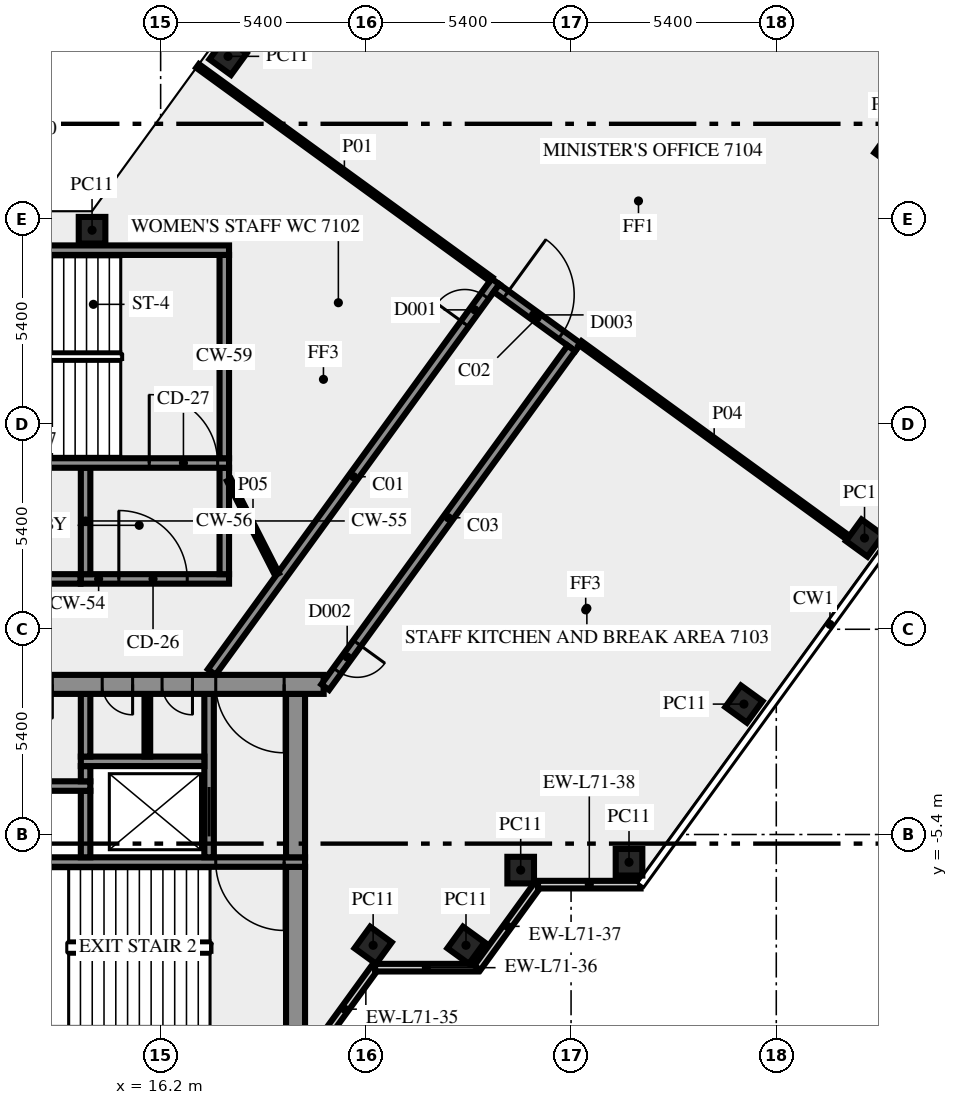
"""IFC4 building model, lengths in metres.
Left out: names, types, materials, properties, quantities, classifications, styles, units other than length and angle.
Written with IfcOpenShell. Run it as: python <this file> out.ifc"""

import sys

from ifc_helpers import new_model, si_unit, direction, frame, frame_2d, origin, origin_2d, place, context, subcontext, project, spatial, rectangle, extrude, element, fill, save


model = new_model("IFC4")
c1 = context("Model", 3, precision=1e-05, world=origin(), true_north=direction((0.0, 1.0)))
c2 = subcontext(c1, "Body", "Model", "MODEL_VIEW")
j1 = project(units=[si_unit("LENGTHUNIT", "METRE"), si_unit("PLANEANGLEUNIT", "RADIAN")], contexts=[c1])
p1 = place(None, origin())
s1 = spatial("IfcSite", under=j1, at=p1, CompositionType="ELEMENT")
p2 = place(p1, origin())
s2 = spatial("IfcBuilding", under=s1, at=p2, CompositionType="ELEMENT")
p3 = place(p2, frame((0.0, 0.0, 307.0)))
s3 = spatial("IfcBuildingStorey", under=s2, at=p3, CompositionType="ELEMENT", Elevation=307.0)
for number, where, z_axis, x_axis in (
    (1, (21.792, -8.315, 0.0), (0.0, 0.0, 1.0), (0.588, 0.809, 0.0)),
    (2, (24.235, -8.315, 0.0), (0.0, 0.0, 1.0), (0.588, 0.809, 0.0)),
    (3, (25.674, -6.337, 0.0), (0.0, 0.0, 1.0), (1.0, 0.0, 0.0)),
    (4, (28.525, -6.13, 0.0), (0.0, 0.0, 1.0), (1.0, 0.0, 0.0)),
    (5, (31.548, -1.969, 0.0), (0.0, 0.0, 1.0), (0.588, 0.809, 0.0)),
    (6, (34.722, 2.4, 0.0), (0.0, 0.0, 1.0), (0.588, 0.809, 0.0)),
    (7, (35.471, 12.616, 0.0), (0.0, 0.0, 1.0), (-0.809, 0.588, 0.0)),
    (8, (17.974, 15.075, 0.0), (0.0, 0.0, 1.0), (-0.588, -0.809, 0.0)),
    (9, (14.395, 10.5, 0.0), (0.0, 0.0, 1.0), (-1.0, 0.0, 0.0)),
):
    element("IfcColumn", number, at=place(p3, frame(where, z_axis=z_axis, x_axis=x_axis)), inside=s3, PredefinedType="COLUMN", context=c2, shape_type="SweptSolid", body=[
        extrude(rectangle(XDim=0.7, YDim=0.7, at=origin_2d()), origin(), (0.0, 0.0, 1.0), 3.65),
    ])
p4 = place(p3, frame((20.253, -11.083, 0.0), z_axis=(0.0, 0.0, 1.0), x_axis=(0.587766567315, 0.809030569476, 0.0)))
e10 = element("IfcWall", 10, at=p4, inside=s3, PredefinedType="SOLIDWALL", context=c2, shape_type="SweptSolid", body=[
    extrude(rectangle(XDim=2.688, YDim=0.2, at=frame_2d((1.344, 0.0))), origin(), (0.0, 0.0, 1.0), 3.65),
])
p5 = place(p3, frame((21.843, -8.904, 0.0), z_axis=(0.0, 0.0, 1.0), x_axis=(1.0, 0.0, 0.0)))
e11 = element("IfcWall", 11, at=p5, inside=s3, PredefinedType="SOLIDWALL", context=c2, shape_type="SweptSolid", body=[
    extrude(rectangle(XDim=2.7, YDim=0.2, at=frame_2d((1.35, 0.0))), origin(), (0.0, 0.0, 1.0), 3.65),
])
p6 = place(p3, frame((24.533, -8.909, 0.0), z_axis=(0.0, 0.0, 1.0), x_axis=(0.587720002413, 0.809064397168, 0.0)))
e12 = element("IfcWall", 12, at=p6, inside=s3, PredefinedType="SOLIDWALL", context=c2, shape_type="SweptSolid", body=[
    extrude(rectangle(XDim=2.7, YDim=0.2, at=frame_2d((1.35, 0.0))), origin(), (0.0, 0.0, 1.0), 3.65),
])
p7 = place(p3, frame((26.13, -6.719, 0.0), z_axis=(0.0, 0.0, 1.0), x_axis=(1.0, 0.0, 0.0)))
e13 = element("IfcWall", 13, at=p7, inside=s3, PredefinedType="SOLIDWALL", context=c2, shape_type="SweptSolid", body=[
    extrude(rectangle(XDim=2.7, YDim=0.2, at=frame_2d((1.35, 0.0))), origin(), (0.0, 0.0, 1.0), 3.65),
])
p8 = place(p3, frame((19.75, -10.5, 0.0), z_axis=(0.0, 0.0, 1.0), x_axis=(0.0, 1.0, 0.0)))
e14 = element("IfcWall", 14, at=p8, inside=s3, PredefinedType="SHEAR", context=c2, shape_type="SweptSolid", body=[
    extrude(rectangle(XDim=4.25, YDim=0.5, at=frame_2d((2.125, 0.0))), origin(), (0.0, 0.0, 1.0), 3.65),
])
p9 = place(p3, frame((20.0, -6.125, 0.0), z_axis=(0.0, 0.0, 1.0), x_axis=(-1.0, 0.0, 0.0)))
e15 = element("IfcWall", 15, at=p9, inside=s3, PredefinedType="SHEAR", context=c2, shape_type="SweptSolid", body=[
    extrude(rectangle(XDim=10.2, YDim=0.25, at=frame_2d((5.1, 0.0))), origin(), (0.0, 0.0, 1.0), 3.65),
])
p10 = place(p9, frame((0.55, 0.0, 0.0)))
e16 = element("IfcOpeningElement", 16, at=p10, cuts=e15, PredefinedType="OPENING", context=c2, shape_type="SweptSolid", body=[
    extrude(rectangle(XDim=1.8, YDim=2.1, at=frame_2d((0.9, 1.05))), frame((0.0, 0.135, 0.0), z_axis=(0.0, -1.0, 0.0), x_axis=(1.0, 0.0, 0.0)), (0.0, 0.0, 1.0), 0.27),
])
p11 = place(p3, frame((14.225, -6.0, 0.0), z_axis=(0.0, 0.0, 1.0), x_axis=(0.0, 1.0, 0.0)))
e17 = element("IfcWall", 17, at=p11, inside=s3, PredefinedType="SHEAR", context=c2, shape_type="SweptSolid", body=[
    extrude(rectangle(XDim=1.75, YDim=0.25, at=frame_2d((0.875, 0.0))), origin(), (0.0, 0.0, 1.0), 3.65),
])
p12 = place(p3, frame((17.475, -6.0, 0.0), z_axis=(0.0, 0.0, 1.0), x_axis=(0.0, 1.0, 0.0)))
e18 = element("IfcWall", 18, at=p12, inside=s3, PredefinedType="SHEAR", context=c2, shape_type="SweptSolid", body=[
    extrude(rectangle(XDim=4.3, YDim=0.25, at=frame_2d((2.15, 0.0))), origin(), (0.0, 0.0, 1.0), 3.65),
])
p13 = place(p12, frame((0.55, 0.0, 0.0)))
e19 = element("IfcOpeningElement", 19, at=p13, cuts=e18, PredefinedType="OPENING", context=c2, shape_type="SweptSolid", body=[
    extrude(rectangle(XDim=1.3, YDim=2.1, at=frame_2d((0.65, 1.05))), frame((0.0, 0.135, 0.0), z_axis=(0.0, -1.0, 0.0), x_axis=(1.0, 0.0, 0.0)), (0.0, 0.0, 1.0), 0.27),
])
p14 = place(p3, frame((19.75, -6.0, 0.0), z_axis=(0.0, 0.0, 1.0), x_axis=(0.0, 1.0, 0.0)))
e20 = element("IfcWall", 20, at=p14, inside=s3, PredefinedType="SHEAR", context=c2, shape_type="SweptSolid", body=[
    extrude(rectangle(XDim=4.3, YDim=0.5, at=frame_2d((2.15, 0.0))), origin(), (0.0, 0.0, 1.0), 3.65),
])
p15 = place(p3, frame((-0.6, -4.125, 0.0), z_axis=(0.0, 0.0, 1.0), x_axis=(1.0, 0.0, 0.0)))
e21 = element("IfcWall", 21, at=p15, inside=s3, PredefinedType="SHEAR", context=c2, shape_type="SweptSolid", body=[
    extrude(rectangle(XDim=14.95, YDim=0.25, at=frame_2d((7.475, 0.0))), origin(), (0.0, 0.0, 1.0), 3.65),
])
p16 = place(p15, frame((2.75, 0.0, 0.0)))
e22 = element("IfcOpeningElement", 22, at=p16, cuts=e21, PredefinedType="OPENING", context=c2, shape_type="SweptSolid", body=[
    extrude(rectangle(XDim=1.3, YDim=2.1, at=frame_2d((0.65, 1.05))), frame((0.0, 0.135, 0.0), z_axis=(0.0, -1.0, 0.0), x_axis=(1.0, 0.0, 0.0)), (0.0, 0.0, 1.0), 0.27),
])
p17 = place(p3, frame((14.225, -4.0, 0.0), z_axis=(0.0, 0.0, 1.0), x_axis=(0.0, 1.0, 0.0)))
e23 = element("IfcWall", 23, at=p17, inside=s3, PredefinedType="SHEAR", context=c2, shape_type="SweptSolid", body=[
    extrude(rectangle(XDim=0.4, YDim=0.25, at=frame_2d((0.2, 0.0))), origin(), (0.0, 0.0, 1.0), 3.65),
])
p18 = place(p3, frame((14.1, -3.475, 0.0), z_axis=(0.0, 0.0, 1.0), x_axis=(1.0, 0.0, 0.0)))
e24 = element("IfcWall", 24, at=p18, inside=s3, PredefinedType="SHEAR", context=c2, shape_type="SweptSolid", body=[
    extrude(rectangle(XDim=3.25, YDim=0.25, at=frame_2d((1.625, 0.0))), origin(), (0.0, 0.0, 1.0), 3.65),
])
p19 = place(p3, frame((14.225, -3.35, 0.0), z_axis=(0.0, 0.0, 1.0), x_axis=(0.0, 1.0, 0.0)))
e25 = element("IfcWall", 25, at=p19, inside=s3, PredefinedType="SHEAR", context=c2, shape_type="SweptSolid", body=[
    extrude(rectangle(XDim=1.65, YDim=0.25, at=frame_2d((0.825, 0.0))), origin(), (0.0, 0.0, 1.0), 3.65),
])
p20 = place(p3, frame((15.85, -3.35, 0.0), z_axis=(0.0, 0.0, 1.0), x_axis=(0.0, 1.0, 0.0)))
e26 = element("IfcWall", 26, at=p20, inside=s3, PredefinedType="PARTITIONING", context=c2, shape_type="SweptSolid", body=[
    extrude(rectangle(XDim=1.65, YDim=0.15, at=frame_2d((0.825, 0.0))), origin(), (0.0, 0.0, 1.0), 3.65),
])
p21 = place(p3, frame((20.49, -1.45, 0.0), z_axis=(0.0, 0.0, 1.0), x_axis=(-1.0, 0.0, 0.0)))
e27 = element("IfcWall", 27, at=p21, inside=s3, PredefinedType="SHEAR", context=c2, shape_type="SweptSolid", body=[
    extrude(rectangle(XDim=40.98, YDim=0.5, at=frame_2d((20.49, 0.0))), origin(), (0.0, 0.0, 1.0), 3.65),
])
p22 = place(p21, frame((38.14, 0.0, 0.0)))
e28 = element("IfcOpeningElement", 28, at=p22, cuts=e27, PredefinedType="OPENING", context=c2, shape_type="SweptSolid", body=[
    extrude(rectangle(XDim=1.8, YDim=2.1, at=frame_2d((0.9, 1.05))), frame((0.0, 0.26, 0.0), z_axis=(0.0, -1.0, 0.0), x_axis=(1.0, 0.0, 0.0)), (0.0, 0.0, 1.0), 0.52),
])
p23 = place(p21, frame((35.89, 0.0, 0.0)))
e29 = element("IfcOpeningElement", 29, at=p23, cuts=e27, PredefinedType="OPENING", context=c2, shape_type="SweptSolid", body=[
    extrude(rectangle(XDim=0.9, YDim=2.1, at=frame_2d((0.45, 1.05))), frame((0.0, 0.26, 0.0), z_axis=(0.0, -1.0, 0.0), x_axis=(1.0, 0.0, 0.0)), (0.0, 0.0, 1.0), 0.52),
])
p24 = place(p21, frame((32.94, 0.0, 0.0)))
e30 = element("IfcOpeningElement", 30, at=p24, cuts=e27, PredefinedType="OPENING", context=c2, shape_type="SweptSolid", body=[
    extrude(rectangle(XDim=0.9, YDim=2.1, at=frame_2d((0.45, 1.05))), frame((0.0, 0.26, 0.0), z_axis=(0.0, -1.0, 0.0), x_axis=(1.0, 0.0, 0.0)), (0.0, 0.0, 1.0), 0.52),
])
p25 = place(p21, frame((31.015, 0.0, 0.0)))
e31 = element("IfcOpeningElement", 31, at=p25, cuts=e27, PredefinedType="OPENING", context=c2, shape_type="SweptSolid", body=[
    extrude(rectangle(XDim=0.8, YDim=2.1, at=frame_2d((0.4, 1.05))), frame((0.0, 0.26, 0.0), z_axis=(0.0, -1.0, 0.0), x_axis=(1.0, 0.0, 0.0)), (0.0, 0.0, 1.0), 0.52),
])
p26 = place(p21, frame((24.765, 0.0, 0.0)))
e32 = element("IfcOpeningElement", 32, at=p26, cuts=e27, PredefinedType="OPENING", context=c2, shape_type="SweptSolid", body=[
    extrude(rectangle(XDim=0.8, YDim=2.1, at=frame_2d((0.4, 1.05))), frame((0.0, 0.26, 0.0), z_axis=(0.0, -1.0, 0.0), x_axis=(1.0, 0.0, 0.0)), (0.0, 0.0, 1.0), 0.52),
])
p27 = place(p21, frame((21.765, 0.0, 0.0)))
e33 = element("IfcOpeningElement", 33, at=p27, cuts=e27, PredefinedType="OPENING", context=c2, shape_type="SweptSolid", body=[
    extrude(rectangle(XDim=2.0, YDim=2.1, at=frame_2d((1.0, 1.05))), frame((0.0, 0.26, 0.0), z_axis=(0.0, -1.0, 0.0), x_axis=(1.0, 0.0, 0.0)), (0.0, 0.0, 1.0), 0.52),
])
p28 = place(p21, frame((12.24, 0.0, 0.0)))
e34 = element("IfcOpeningElement", 34, at=p28, cuts=e27, PredefinedType="OPENING", context=c2, shape_type="SweptSolid", body=[
    extrude(rectangle(XDim=0.9, YDim=2.1, at=frame_2d((0.45, 1.05))), frame((0.0, 0.26, 0.0), z_axis=(0.0, -1.0, 0.0), x_axis=(1.0, 0.0, 0.0)), (0.0, 0.0, 1.0), 0.52),
])
p29 = place(p21, frame((7.14, 0.0, 0.0)))
e35 = element("IfcOpeningElement", 35, at=p29, cuts=e27, PredefinedType="OPENING", context=c2, shape_type="SweptSolid", body=[
    extrude(rectangle(XDim=0.9, YDim=2.1, at=frame_2d((0.45, 1.05))), frame((0.0, 0.26, 0.0), z_axis=(0.0, -1.0, 0.0), x_axis=(1.0, 0.0, 0.0)), (0.0, 0.0, 1.0), 0.52),
])
p30 = place(p21, frame((5.028, 0.0, 0.0)))
e36 = element("IfcOpeningElement", 36, at=p30, cuts=e27, PredefinedType="OPENING", context=c2, shape_type="SweptSolid", body=[
    extrude(rectangle(XDim=0.8, YDim=2.1, at=frame_2d((0.4, 1.05))), frame((0.0, 0.26, 0.0), z_axis=(0.0, -1.0, 0.0), x_axis=(1.0, 0.0, 0.0)), (0.0, 0.0, 1.0), 0.52),
])
p31 = place(p21, frame((3.452, 0.0, 0.0)))
e37 = element("IfcOpeningElement", 37, at=p31, cuts=e27, PredefinedType="OPENING", context=c2, shape_type="SweptSolid", body=[
    extrude(rectangle(XDim=0.8, YDim=2.1, at=frame_2d((0.4, 1.05))), frame((0.0, 0.26, 0.0), z_axis=(0.0, -1.0, 0.0), x_axis=(1.0, 0.0, 0.0)), (0.0, 0.0, 1.0), 0.52),
])
p32 = place(p21, frame((1.04, 0.0, 0.0)))
e38 = element("IfcOpeningElement", 38, at=p32, cuts=e27, PredefinedType="OPENING", context=c2, shape_type="SweptSolid", body=[
    extrude(rectangle(XDim=1.8, YDim=2.1, at=frame_2d((0.9, 1.05))), frame((0.0, 0.26, 0.0), z_axis=(0.0, -1.0, 0.0), x_axis=(1.0, 0.0, 0.0)), (0.0, 0.0, 1.0), 0.52),
])
p33 = place(p3, frame((14.1, 1.325, 0.0), z_axis=(0.0, 0.0, 1.0), x_axis=(1.0, 0.0, 0.0)))
e39 = element("IfcWall", 39, at=p33, inside=s3, PredefinedType="SHEAR", context=c2, shape_type="SweptSolid", body=[
    extrude(rectangle(XDim=3.9, YDim=0.25, at=frame_2d((1.95, 0.0))), origin(), (0.0, 0.0, 1.0), 3.65),
])
p34 = place(p33, frame((1.0, 0.0, 0.0)))
e40 = element("IfcOpeningElement", 40, at=p34, cuts=e39, PredefinedType="OPENING", context=c2, shape_type="SweptSolid", body=[
    extrude(rectangle(XDim=1.8, YDim=2.1, at=frame_2d((0.9, 1.05))), frame((0.0, 0.135, 0.0), z_axis=(0.0, -1.0, 0.0), x_axis=(1.0, 0.0, 0.0)), (0.0, 0.0, 1.0), 0.27),
])
for number, where, z_axis, x_axis in (
    (41, (14.225, 1.45, 0.0), (0.0, 0.0, 1.0), (0.0, 1.0, 0.0)),
    (42, (17.875, 1.45, 0.0), (0.0, 0.0, 1.0), (0.0, 1.0, 0.0)),
):
    element("IfcWall", number, at=place(p3, frame(where, z_axis=z_axis, x_axis=x_axis)), inside=s3, PredefinedType="SHEAR", context=c2, shape_type="SweptSolid", body=[
        extrude(rectangle(XDim=2.8, YDim=0.25, at=frame_2d((1.4, 0.0))), origin(), (0.0, 0.0, 1.0), 3.65),
    ])
p35 = place(p3, frame((7.5, 4.375, 0.0), z_axis=(0.0, 0.0, 1.0), x_axis=(1.0, 0.0, 0.0)))
e43 = element("IfcWall", 43, at=p35, inside=s3, PredefinedType="SHEAR", context=c2, shape_type="SweptSolid", body=[
    extrude(rectangle(XDim=10.5, YDim=0.25, at=frame_2d((5.25, 0.0))), origin(), (0.0, 0.0, 1.0), 3.65),
])
p36 = place(p35, frame((8.4, 0.0, 0.0)))
e44 = element("IfcOpeningElement", 44, at=p36, cuts=e43, PredefinedType="OPENING", context=c2, shape_type="SweptSolid", body=[
    extrude(rectangle(XDim=1.8, YDim=2.1, at=frame_2d((0.9, 1.05))), frame((0.0, 0.135, 0.0), z_axis=(0.0, -1.0, 0.0), x_axis=(1.0, 0.0, 0.0)), (0.0, 0.0, 1.0), 0.27),
])
p37 = place(p3, frame((17.875, 4.5, 0.0), z_axis=(0.0, 0.0, 1.0), x_axis=(0.0, 1.0, 0.0)))
e45 = element("IfcWall", 45, at=p37, inside=s3, PredefinedType="SHEAR", context=c2, shape_type="SweptSolid", body=[
    extrude(rectangle(XDim=5.35, YDim=0.25, at=frame_2d((2.675, 0.0))), origin(), (0.0, 0.0, 1.0), 3.65),
])
p38 = place(p3, frame((7.5, 9.975, 0.0), z_axis=(0.0, 0.0, 1.0), x_axis=(1.0, 0.0, 0.0)))
e46 = element("IfcWall", 46, at=p38, inside=s3, PredefinedType="SHEAR", context=c2, shape_type="SweptSolid", body=[
    extrude(rectangle(XDim=10.5, YDim=0.25, at=frame_2d((5.25, 0.0))), origin(), (0.0, 0.0, 1.0), 3.65),
])
p39 = place(p38, frame((2.0, 0.0, 1.0)))
e47 = element("IfcOpeningElement", 47, at=p39, cuts=e46, PredefinedType="OPENING", context=c2, shape_type="SweptSolid", body=[
    extrude(rectangle(XDim=1.2, YDim=1.2, at=frame_2d((0.6, 0.6))), frame((0.0, 0.135, 0.0), z_axis=(0.0, -1.0, 0.0), x_axis=(1.0, 0.0, 0.0)), (0.0, 0.0, 1.0), 0.27),
])
p40 = place(p3, frame((17.545, -1.125, 0.0), z_axis=(0.0, 0.0, 1.0), x_axis=(0.587796810203, 0.809008596935, 0.0)))
e48 = element("IfcWall", 48, at=p40, inside=s3, PredefinedType="SOLIDWALL", context=c2, shape_type="SweptSolid", body=[
    extrude(rectangle(XDim=12.703, YDim=0.25, at=frame_2d((6.352, 0.0))), origin(), (0.0, 0.0, 1.0), 3.65),
])
p41 = place(p40, frame((11.329, 0.0, 0.0)))
e49 = element("IfcOpeningElement", 49, at=p41, cuts=e48, PredefinedType="OPENING", context=c2, shape_type="SweptSolid", body=[
    extrude(rectangle(XDim=0.9, YDim=2.1, at=frame_2d((0.45, 1.05))), frame((0.0, 0.135, 0.0), z_axis=(0.0, -1.0, 0.0), x_axis=(1.0, 0.0, 0.0)), (0.0, 0.0, 1.0), 0.27),
])
p42 = place(p3, frame((25.039, 8.978, 0.0), z_axis=(0.0, 0.0, 1.0), x_axis=(0.809006914995, -0.587799125119, 0.0)))
e50 = element("IfcWall", 50, at=p42, inside=s3, PredefinedType="SOLIDWALL", context=c2, shape_type="SweptSolid", body=[
    extrude(rectangle(XDim=2.65, YDim=0.25, at=frame_2d((1.325, 0.0))), origin(), (0.0, 0.0, 1.0), 3.65),
])
p43 = place(p42, frame((0.301, 0.0, 0.0)))
e51 = element("IfcOpeningElement", 51, at=p43, cuts=e50, PredefinedType="OPENING", context=c2, shape_type="SweptSolid", body=[
    extrude(rectangle(XDim=1.8, YDim=2.1, at=frame_2d((0.9, 1.05))), frame((0.0, 0.135, 0.0), z_axis=(0.0, -1.0, 0.0), x_axis=(1.0, 0.0, 0.0)), (0.0, 0.0, 1.0), 0.27),
])
p44 = place(p3, frame((27.009, 7.392, 0.0), z_axis=(0.0, 0.0, 1.0), x_axis=(-0.587776457057, -0.809023384414, 0.0)))
e52 = element("IfcWall", 52, at=p44, inside=s3, PredefinedType="SOLIDWALL", context=c2, shape_type="SweptSolid", body=[
    extrude(rectangle(XDim=11.021, YDim=0.25, at=frame_2d((5.51, 0.0))), origin(), (0.0, 0.0, 1.0), 3.65),
])
p45 = place(p44, frame((9.588, 0.0, 0.0)))
e53 = element("IfcOpeningElement", 53, at=p45, cuts=e52, PredefinedType="OPENING", context=c2, shape_type="SweptSolid", body=[
    extrude(rectangle(XDim=0.9, YDim=2.1, at=frame_2d((0.45, 1.05))), frame((0.0, 0.135, 0.0), z_axis=(0.0, -1.0, 0.0), x_axis=(1.0, 0.0, 0.0)), (0.0, 0.0, 1.0), 0.27),
])
p46 = place(p3, frame((-5.246, 1.325, 0.0), z_axis=(0.0, 0.0, 1.0), x_axis=(1.0, 0.0, 0.0)))
e54 = element("IfcWall", 54, at=p46, inside=s3, PredefinedType="SOLIDWALL", context=c2, shape_type="SweptSolid", body=[
    extrude(rectangle(XDim=19.336, YDim=0.25, at=frame_2d((9.668, 0.0))), origin(), (0.0, 0.0, 1.0), 3.65),
])
p47 = place(p46, frame((8.771, 0.0, 0.0)))
e55 = element("IfcOpeningElement", 55, at=p47, cuts=e54, PredefinedType="OPENING", context=c2, shape_type="SweptSolid", body=[
    extrude(rectangle(XDim=1.8, YDim=2.1, at=frame_2d((0.9, 1.05))), frame((0.0, 0.135, 0.0), z_axis=(0.0, -1.0, 0.0), x_axis=(1.0, 0.0, 0.0)), (0.0, 0.0, 1.0), 0.27),
])
p48 = place(p3, frame((24.898, 9.209, 0.0), z_axis=(0.0, 0.0, 1.0), x_axis=(-0.809013490065, 0.587790075531, 0.0)))
e56 = element("IfcWall", 56, at=p48, inside=s3, PredefinedType="PARTITIONING", context=c2, shape_type="SweptSolid", body=[
    extrude(rectangle(XDim=9.549, YDim=0.12, at=frame_2d((4.775, 0.0))), origin(), (0.0, 0.0, 1.0), 2.95),
])
p49 = place(p3, frame((27.24, 7.532, 0.0), z_axis=(0.0, 0.0, 1.0), x_axis=(0.809027940177, -0.587770186393, 0.0)))
e57 = element("IfcWall", 57, at=p49, inside=s3, PredefinedType="PARTITIONING", context=c2, shape_type="SweptSolid", body=[
    extrude(rectangle(XDim=8.715, YDim=0.12, at=frame_2d((4.357, 0.0))), origin(), (0.0, 0.0, 1.0), 3.65),
])
p50 = place(p3, frame((18.0, 3.925, 0.0), z_axis=(0.0, 0.0, 1.0), x_axis=(0.453950796792, -0.891026752736, 0.0)))
e58 = element("IfcWall", 58, at=p50, inside=s3, PredefinedType="PARTITIONING", context=c2, shape_type="SweptSolid", body=[
    extrude(rectangle(XDim=2.778, YDim=0.12, at=frame_2d((1.389, 0.0))), origin(), (0.0, 0.0, 1.0), 3.65),
])
p51 = place(p10, origin())
e59 = element("IfcDoor", 59, at=p51, inside=s3, OperationType="DOUBLE_DOOR_SINGLE_SWING", PredefinedType="DOOR", context=c2, shape_type="SweptSolid", body=[
    extrude(rectangle(XDim=1.8, YDim=2.1, at=frame_2d((0.9, 1.05))), frame((0.0, 0.025, 0.0), z_axis=(0.0, -1.0, 0.0), x_axis=(1.0, 0.0, 0.0)), (0.0, 0.0, 1.0), 0.05),
])
fill(e16, e59)
p52 = place(p13, origin())
e60 = element("IfcDoor", 60, at=p52, inside=s3, OperationType="DOUBLE_DOOR_SLIDING", PredefinedType="DOOR", context=c2, shape_type="SweptSolid", body=[
    extrude(rectangle(XDim=1.3, YDim=2.1, at=frame_2d((0.65, 1.05))), frame((0.0, 0.025, 0.0), z_axis=(0.0, -1.0, 0.0), x_axis=(1.0, 0.0, 0.0)), (0.0, 0.0, 1.0), 0.05),
])
fill(e19, e60)
p53 = place(p30, origin())
e61 = element("IfcDoor", 61, at=p53, inside=s3, OperationType="SINGLE_SWING_LEFT", PredefinedType="DOOR", context=c2, shape_type="SweptSolid", body=[
    extrude(rectangle(XDim=0.8, YDim=2.1, at=frame_2d((0.4, 1.05))), frame((0.0, 0.025, 0.0), z_axis=(0.0, -1.0, 0.0), x_axis=(1.0, 0.0, 0.0)), (0.0, 0.0, 1.0), 0.05),
])
fill(e36, e61)
p54 = place(p31, origin())
e62 = element("IfcDoor", 62, at=p54, inside=s3, OperationType="SINGLE_SWING_LEFT", PredefinedType="DOOR", context=c2, shape_type="SweptSolid", body=[
    extrude(rectangle(XDim=0.8, YDim=2.1, at=frame_2d((0.4, 1.05))), frame((0.0, 0.025, 0.0), z_axis=(0.0, -1.0, 0.0), x_axis=(1.0, 0.0, 0.0)), (0.0, 0.0, 1.0), 0.05),
])
fill(e37, e62)
p55 = place(p32, origin())
e63 = element("IfcDoor", 63, at=p55, inside=s3, OperationType="DOUBLE_DOOR_SINGLE_SWING", PredefinedType="DOOR", context=c2, shape_type="SweptSolid", body=[
    extrude(rectangle(XDim=1.8, YDim=2.1, at=frame_2d((0.9, 1.05))), frame((0.0, 0.025, 0.0), z_axis=(0.0, -1.0, 0.0), x_axis=(1.0, 0.0, 0.0)), (0.0, 0.0, 1.0), 0.05),
])
fill(e38, e63)
p56 = place(p34, origin())
e64 = element("IfcDoor", 64, at=p56, inside=s3, OperationType="DOUBLE_DOOR_SINGLE_SWING", PredefinedType="DOOR", context=c2, shape_type="SweptSolid", body=[
    extrude(rectangle(XDim=1.8, YDim=2.1, at=frame_2d((0.9, 1.05))), frame((0.0, 0.025, 0.0), z_axis=(0.0, -1.0, 0.0), x_axis=(1.0, 0.0, 0.0)), (0.0, 0.0, 1.0), 0.05),
])
fill(e40, e64)
p57 = place(p36, origin())
e65 = element("IfcDoor", 65, at=p57, inside=s3, OperationType="DOUBLE_DOOR_SINGLE_SWING", PredefinedType="DOOR", context=c2, shape_type="SweptSolid", body=[
    extrude(rectangle(XDim=1.8, YDim=2.1, at=frame_2d((0.9, 1.05))), frame((0.0, 0.025, 0.0), z_axis=(0.0, -1.0, 0.0), x_axis=(1.0, 0.0, 0.0)), (0.0, 0.0, 1.0), 0.05),
])
fill(e44, e65)
p58 = place(p41, origin())
e66 = element("IfcDoor", 66, at=p58, inside=s3, OperationType="SINGLE_SWING_RIGHT", PredefinedType="DOOR", context=c2, shape_type="SweptSolid", body=[
    extrude(rectangle(XDim=0.9, YDim=2.1, at=frame_2d((0.45, 1.05))), frame((0.0, 0.025, 0.0), z_axis=(0.0, -1.0, 0.0), x_axis=(1.0, 0.0, 0.0)), (0.0, 0.0, 1.0), 0.05),
])
fill(e49, e66)
p59 = place(p43, origin())
e67 = element("IfcDoor", 67, at=p59, inside=s3, OperationType="DOUBLE_DOOR_SINGLE_SWING", PredefinedType="DOOR", context=c2, shape_type="SweptSolid", body=[
    extrude(rectangle(XDim=1.8, YDim=2.1, at=frame_2d((0.9, 1.05))), frame((0.0, 0.025, 0.0), z_axis=(0.0, -1.0, 0.0), x_axis=(1.0, 0.0, 0.0)), (0.0, 0.0, 1.0), 0.05),
])
fill(e51, e67)
p60 = place(p45, origin())
e68 = element("IfcDoor", 68, at=p60, inside=s3, OperationType="SINGLE_SWING_RIGHT", PredefinedType="DOOR", context=c2, shape_type="SweptSolid", body=[
    extrude(rectangle(XDim=0.9, YDim=2.1, at=frame_2d((0.45, 1.05))), frame((0.0, 0.025, 0.0), z_axis=(0.0, -1.0, 0.0), x_axis=(1.0, 0.0, 0.0)), (0.0, 0.0, 1.0), 0.05),
])
fill(e53, e68)
save(model, sys.argv[1])
